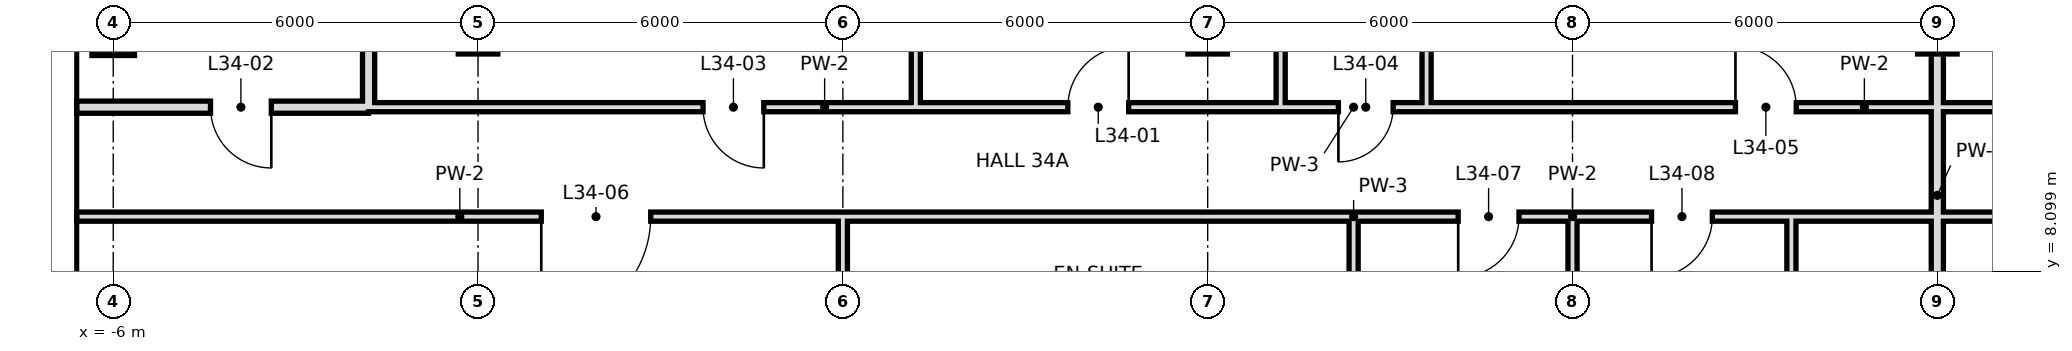
"""IFC4 building model, lengths in metres.
Left out: names, types, materials, properties, quantities, classifications, styles, units other than length and angle.
Written with IfcOpenShell. Run it as: python <this file> out.ifc"""

import sys

from ifc_helpers import new_model, si_unit, direction, frame, frame_2d, origin, origin_2d, place, context, subcontext, project, spatial, rectangle, hollow_rectangle, extrude, element, fill, save


model = new_model("IFC4")
c1 = context("Model", 3, precision=1e-05, world=origin(), true_north=direction((0.0, 1.0)))
c2 = subcontext(c1, "Body", "Model", "MODEL_VIEW")
j1 = project(units=[si_unit("LENGTHUNIT", "METRE"), si_unit("PLANEANGLEUNIT", "RADIAN")], contexts=[c1])
p1 = place(None, origin())
s1 = spatial("IfcSite", under=j1, at=p1, CompositionType="ELEMENT")
p2 = place(p1, origin())
s2 = spatial("IfcBuilding", under=s1, at=p2, CompositionType="ELEMENT")
p3 = place(p2, frame((0.0, 0.0, 151.0)))
s3 = spatial("IfcBuildingStorey", under=s2, at=p3, CompositionType="ELEMENT", Elevation=151.0)
p4 = place(p3, frame((-6.0, 12.0, 0.0), z_axis=(0.0, 0.0, 1.0), x_axis=(1.0, 0.0, 0.0)))
e1 = element("IfcColumn", 1, at=p4, inside=s3, PredefinedType="COLUMN", context=c2, shape_type="SweptSolid", body=[
    extrude(hollow_rectangle(XDim=0.7, YDim=0.7, WallThickness=0.036, at=origin_2d()), origin(), (0.0, 0.0, 1.0), 3.6),
])
for number, where, z_axis, x_axis in (
    (2, (0.0, 12.0, 0.0), (0.0, 0.0, 1.0), (1.0, 0.0, 0.0)),
    (3, (12.0, 12.0, 0.0), (0.0, 0.0, 1.0), (1.0, 0.0, 0.0)),
    (4, (24.0, 12.0, 0.0), (0.0, 0.0, 1.0), (1.0, 0.0, 0.0)),
):
    element("IfcColumn", number, at=place(p3, frame(where, z_axis=z_axis, x_axis=x_axis)), inside=s3, PredefinedType="COLUMN", context=c2, shape_type="SweptSolid", body=[
        extrude(hollow_rectangle(XDim=0.65, YDim=0.65, WallThickness=0.032, at=origin_2d()), origin(), (0.0, 0.0, 1.0), 3.6),
    ])
p5 = place(p3, frame((-1.8, 10.8, 0.0), z_axis=(0.0, 0.0, 1.0), x_axis=(0.0, 1.0, 0.0)))
e5 = element("IfcWall", 5, at=p5, inside=s3, PredefinedType="SOLIDWALL", context=c2, shape_type="SweptSolid", body=[
    extrude(rectangle(XDim=7.2, YDim=0.2, at=frame_2d((3.6, 0.0))), origin(), (0.0, 0.0, 1.0), 3.42),
])
p6 = place(p3, frame((13.2, 10.8, 0.0), z_axis=(0.0, 0.0, 1.0), x_axis=(0.0, 1.0, 0.0)))
e6 = element("IfcWall", 6, at=p6, inside=s3, PredefinedType="PARTITIONING", context=c2, shape_type="SweptSolid", body=[
    extrude(rectangle(XDim=7.9, YDim=0.15, at=frame_2d((3.95, 0.0))), origin(), (0.0, 0.0, 1.0), 3.42),
])
p7 = place(p3, frame((14.4, 6.0, 0.0), z_axis=(0.0, 0.0, 1.0), x_axis=(0.0, 1.0, 0.0)))
e7 = element("IfcWall", 7, at=p7, inside=s3, PredefinedType="PARTITIONING", context=c2, shape_type="SweptSolid", body=[
    extrude(rectangle(XDim=3.0, YDim=0.15, at=frame_2d((1.5, 0.0))), origin(), (0.0, 0.0, 1.0), 3.42),
])
p8 = place(p3, frame((15.6, 10.8, 0.0), z_axis=(0.0, 0.0, 1.0), x_axis=(0.0, 1.0, 0.0)))
e8 = element("IfcWall", 8, at=p8, inside=s3, PredefinedType="PARTITIONING", context=c2, shape_type="SweptSolid", body=[
    extrude(rectangle(XDim=7.9, YDim=0.15, at=frame_2d((3.95, 0.0))), origin(), (0.0, 0.0, 1.0), 3.42),
])
p9 = place(p3, frame((18.0, -0.6, 0.0), z_axis=(0.0, 0.0, 1.0), x_axis=(0.0, 1.0, 0.0)))
e9 = element("IfcWall", 9, at=p9, inside=s3, PredefinedType="PARTITIONING", context=c2, shape_type="SweptSolid", body=[
    extrude(rectangle(XDim=9.6, YDim=0.15, at=frame_2d((4.8, 0.0))), origin(), (0.0, 0.0, 1.0), 2.72),
])
p10 = place(p3, frame((21.6, 6.0, 0.0), z_axis=(0.0, 0.0, 1.0), x_axis=(0.0, 1.0, 0.0)))
e10 = element("IfcWall", 10, at=p10, inside=s3, PredefinedType="PARTITIONING", context=c2, shape_type="SweptSolid", body=[
    extrude(rectangle(XDim=3.0, YDim=0.15, at=frame_2d((1.5, 0.0))), origin(), (0.0, 0.0, 1.0), 3.42),
])
p11 = place(p3, frame((24.0, 0.0, 0.0), z_axis=(0.0, 0.0, 1.0), x_axis=(0.0, 1.0, 0.0)))
e11 = element("IfcWall", 11, at=p11, inside=s3, PredefinedType="SOLIDWALL", context=c2, shape_type="SweptSolid", body=[
    extrude(rectangle(XDim=18.7, YDim=0.2, at=frame_2d((9.35, 0.0))), origin(), (0.0, 0.0, 1.0), 2.72),
])
p12 = place(p3, frame((6.0, 6.0, 0.0), z_axis=(0.0, 0.0, 1.0), x_axis=(0.0, 1.0, 0.0)))
e12 = element("IfcWall", 12, at=p12, inside=s3, PredefinedType="PARTITIONING", context=c2, shape_type="SweptSolid", body=[
    extrude(rectangle(XDim=3.0, YDim=0.15, at=frame_2d((1.5, 0.0))), origin(), (0.0, 0.0, 1.0), 2.72),
])
p13 = place(p3, frame((7.2, 10.8, 0.0), z_axis=(0.0, 0.0, 1.0), x_axis=(0.0, 1.0, 0.0)))
e13 = element("IfcWall", 13, at=p13, inside=s3, PredefinedType="PARTITIONING", context=c2, shape_type="SweptSolid", body=[
    extrude(rectangle(XDim=7.9, YDim=0.15, at=frame_2d((3.95, 0.0))), origin(), (0.0, 0.0, 1.0), 3.42),
])
p14 = place(p3, frame((-6.6, 10.8, 0.0), z_axis=(0.0, 0.0, 1.0), x_axis=(1.0, 0.0, 0.0)))
e14 = element("IfcWall", 14, at=p14, inside=s3, PredefinedType="SOLIDWALL", context=c2, shape_type="SweptSolid", body=[
    extrude(rectangle(XDim=4.8, YDim=0.2, at=frame_2d((2.4, 0.0))), origin(), (0.0, 0.0, 1.0), 2.97),
])
p15 = place(p14, frame((2.2, 0.0, 0.0)))
e15 = element("IfcOpeningElement", 15, at=p15, cuts=e14, PredefinedType="OPENING", context=c2, shape_type="SweptSolid", body=[
    extrude(rectangle(XDim=1.0, YDim=2.4, at=frame_2d((0.5, 1.2))), frame((0.0, 0.11, 0.0), z_axis=(0.0, -1.0, 0.0), x_axis=(1.0, 0.0, 0.0)), (0.0, 0.0, 1.0), 0.22),
])
p16 = place(p3, frame((-1.8, 10.8, 0.0), z_axis=(0.0, 0.0, 1.0), x_axis=(1.0, 0.0, 0.0)))
e16 = element("IfcWall", 16, at=p16, inside=s3, PredefinedType="PARTITIONING", context=c2, shape_type="SweptSolid", body=[
    extrude(rectangle(XDim=15.0, YDim=0.15, at=frame_2d((7.5, 0.0))), origin(), (0.0, 0.0, 1.0), 3.42),
])
p17 = place(p16, frame((11.5, 0.0, 0.0)))
e17 = element("IfcOpeningElement", 17, at=p17, cuts=e16, PredefinedType="OPENING", context=c2, shape_type="SweptSolid", body=[
    extrude(rectangle(XDim=1.0, YDim=2.4, at=frame_2d((0.5, 1.2))), frame((0.0, 0.085, 0.0), z_axis=(0.0, -1.0, 0.0), x_axis=(1.0, 0.0, 0.0)), (0.0, 0.0, 1.0), 0.17),
])
p18 = place(p16, frame((5.5, 0.0, 0.0)))
e18 = element("IfcOpeningElement", 18, at=p18, cuts=e16, PredefinedType="OPENING", context=c2, shape_type="SweptSolid", body=[
    extrude(rectangle(XDim=1.0, YDim=2.4, at=frame_2d((0.5, 1.2))), frame((0.0, 0.085, 0.0), z_axis=(0.0, -1.0, 0.0), x_axis=(1.0, 0.0, 0.0)), (0.0, 0.0, 1.0), 0.17),
])
p19 = place(p3, frame((15.6, 10.8, 0.0), z_axis=(0.0, 0.0, 1.0), x_axis=(1.0, 0.0, 0.0)))
e19 = element("IfcWall", 19, at=p19, inside=s3, PredefinedType="PARTITIONING", context=c2, shape_type="SweptSolid", body=[
    extrude(rectangle(XDim=14.4, YDim=0.15, at=frame_2d((7.2, 0.0))), origin(), (0.0, 0.0, 1.0), 3.42),
])
p20 = place(p19, frame((5.08, 0.0, 0.0)))
e20 = element("IfcOpeningElement", 20, at=p20, cuts=e19, PredefinedType="OPENING", context=c2, shape_type="SweptSolid", body=[
    extrude(rectangle(XDim=1.0, YDim=2.4, at=frame_2d((0.5, 1.2))), frame((0.0, 0.085, 0.0), z_axis=(0.0, -1.0, 0.0), x_axis=(1.0, 0.0, 0.0)), (0.0, 0.0, 1.0), 0.17),
])
p21 = place(p19, frame((10.9, 0.0, 0.0)))
e21 = element("IfcOpeningElement", 21, at=p21, cuts=e19, PredefinedType="OPENING", context=c2, shape_type="SweptSolid", body=[
    extrude(rectangle(XDim=1.0, YDim=2.4, at=frame_2d((0.5, 1.2))), frame((0.0, 0.085, 0.0), z_axis=(0.0, -1.0, 0.0), x_axis=(1.0, 0.0, 0.0)), (0.0, 0.0, 1.0), 0.17),
])
p22 = place(p3, frame((13.2, 10.8, 0.0), z_axis=(0.0, 0.0, 1.0), x_axis=(1.0, 0.0, 0.0)))
e22 = element("IfcWall", 22, at=p22, inside=s3, PredefinedType="PARTITIONING", context=c2, shape_type="SweptSolid", body=[
    extrude(rectangle(XDim=2.4, YDim=0.15, at=frame_2d((1.2, 0.0))), origin(), (0.0, 0.0, 1.0), 3.42),
])
p23 = place(p22, frame((0.95, 0.0, 0.0)))
e23 = element("IfcOpeningElement", 23, at=p23, cuts=e22, PredefinedType="OPENING", context=c2, shape_type="SweptSolid", body=[
    extrude(rectangle(XDim=0.9, YDim=2.4, at=frame_2d((0.45, 1.2))), frame((0.0, 0.085, 0.0), z_axis=(0.0, -1.0, 0.0), x_axis=(1.0, 0.0, 0.0)), (0.0, 0.0, 1.0), 0.17),
])
p24 = place(p3, frame((-6.6, 9.0, 0.0), z_axis=(0.0, 0.0, 1.0), x_axis=(1.0, 0.0, 0.0)))
e24 = element("IfcWall", 24, at=p24, inside=s3, PredefinedType="PARTITIONING", context=c2, shape_type="SweptSolid", body=[
    extrude(rectangle(XDim=12.6, YDim=0.15, at=frame_2d((6.3, 0.0))), origin(), (0.0, 0.0, 1.0), 3.42),
])
p25 = place(p24, frame((7.64, 0.0, 0.0)))
e25 = element("IfcOpeningElement", 25, at=p25, cuts=e24, PredefinedType="OPENING", context=c2, shape_type="SweptSolid", body=[
    extrude(rectangle(XDim=1.8, YDim=2.4, at=frame_2d((0.9, 1.2))), frame((0.0, 0.085, 0.0), z_axis=(0.0, -1.0, 0.0), x_axis=(1.0, 0.0, 0.0)), (0.0, 0.0, 1.0), 0.17),
])
p26 = place(p3, frame((14.4, 9.0, 0.0), z_axis=(0.0, 0.0, 1.0), x_axis=(1.0, 0.0, 0.0)))
e26 = element("IfcWall", 26, at=p26, inside=s3, PredefinedType="PARTITIONING", context=c2, shape_type="SweptSolid", body=[
    extrude(rectangle(XDim=7.2, YDim=0.15, at=frame_2d((3.6, 0.0))), origin(), (0.0, 0.0, 1.0), 3.42),
])
p27 = place(p26, frame((1.72, 0.0, 0.0)))
e27 = element("IfcOpeningElement", 27, at=p27, cuts=e26, PredefinedType="OPENING", context=c2, shape_type="SweptSolid", body=[
    extrude(rectangle(XDim=1.0, YDim=2.4, at=frame_2d((0.5, 1.2))), frame((0.0, 0.085, 0.0), z_axis=(0.0, -1.0, 0.0), x_axis=(1.0, 0.0, 0.0)), (0.0, 0.0, 1.0), 0.17),
])
p28 = place(p26, frame((4.9, 0.0, 0.0)))
e28 = element("IfcOpeningElement", 28, at=p28, cuts=e26, PredefinedType="OPENING", context=c2, shape_type="SweptSolid", body=[
    extrude(rectangle(XDim=1.0, YDim=2.4, at=frame_2d((0.5, 1.2))), frame((0.0, 0.085, 0.0), z_axis=(0.0, -1.0, 0.0), x_axis=(1.0, 0.0, 0.0)), (0.0, 0.0, 1.0), 0.17),
])
p29 = place(p3, frame((24.0, 9.0, 0.0), z_axis=(0.0, 0.0, 1.0), x_axis=(1.0, 0.0, 0.0)))
e29 = element("IfcWall", 29, at=p29, inside=s3, PredefinedType="PARTITIONING", context=c2, shape_type="SweptSolid", body=[
    extrude(rectangle(XDim=27.6, YDim=0.15, at=frame_2d((13.8, 0.0))), origin(), (0.0, 0.0, 1.0), 3.42),
])
p30 = place(p29, frame((3.16, 0.0, 0.0)))
e30 = element("IfcOpeningElement", 30, at=p30, cuts=e29, PredefinedType="OPENING", context=c2, shape_type="SweptSolid", body=[
    extrude(rectangle(XDim=1.8, YDim=2.4, at=frame_2d((0.9, 1.2))), frame((0.0, 0.085, 0.0), z_axis=(0.0, -1.0, 0.0), x_axis=(1.0, 0.0, 0.0)), (0.0, 0.0, 1.0), 0.17),
])
p31 = place(p29, frame((13.6, 0.0, 0.0)))
e31 = element("IfcOpeningElement", 31, at=p31, cuts=e29, PredefinedType="OPENING", context=c2, shape_type="SweptSolid", body=[
    extrude(rectangle(XDim=1.0, YDim=2.4, at=frame_2d((0.5, 1.2))), frame((0.0, 0.085, 0.0), z_axis=(0.0, -1.0, 0.0), x_axis=(1.0, 0.0, 0.0)), (0.0, 0.0, 1.0), 0.17),
])
p32 = place(p29, frame((21.4, 0.0, 0.0)))
e32 = element("IfcOpeningElement", 32, at=p32, cuts=e29, PredefinedType="OPENING", context=c2, shape_type="SweptSolid", body=[
    extrude(rectangle(XDim=1.0, YDim=2.4, at=frame_2d((0.5, 1.2))), frame((0.0, 0.085, 0.0), z_axis=(0.0, -1.0, 0.0), x_axis=(1.0, 0.0, 0.0)), (0.0, 0.0, 1.0), 0.17),
])
p33 = place(p29, frame((24.88, 0.0, 0.0)))
e33 = element("IfcOpeningElement", 33, at=p33, cuts=e29, PredefinedType="OPENING", context=c2, shape_type="SweptSolid", body=[
    extrude(rectangle(XDim=1.0, YDim=2.4, at=frame_2d((0.5, 1.2))), frame((0.0, 0.085, 0.0), z_axis=(0.0, -1.0, 0.0), x_axis=(1.0, 0.0, 0.0)), (0.0, 0.0, 1.0), 0.17),
])
p34 = place(p3, frame((6.0, 9.0, 0.0), z_axis=(0.0, 0.0, 1.0), x_axis=(1.0, 0.0, 0.0)))
e34 = element("IfcWall", 34, at=p34, inside=s3, PredefinedType="PARTITIONING", context=c2, shape_type="SweptSolid", body=[
    extrude(rectangle(XDim=8.4, YDim=0.15, at=frame_2d((4.2, 0.0))), origin(), (0.0, 0.0, 1.0), 3.42),
])
p35 = place(p3, frame((21.6, 9.0, 0.0), z_axis=(0.0, 0.0, 1.0), x_axis=(1.0, 0.0, 0.0)))
e35 = element("IfcWall", 35, at=p35, inside=s3, PredefinedType="PARTITIONING", context=c2, shape_type="SweptSolid", body=[
    extrude(rectangle(XDim=2.4, YDim=0.15, at=frame_2d((1.2, 0.0))), origin(), (0.0, 0.0, 1.0), 3.42),
])
p36 = place(p17, frame((1.0, 0.0, 0.0), z_axis=(0.0, 0.0, 1.0), x_axis=(-1.0, 0.0, 0.0)))
e36 = element("IfcDoor", 36, at=p36, inside=s3, OperationType="SINGLE_SWING_LEFT", PredefinedType="DOOR", context=c2, shape_type="SweptSolid", body=[
    extrude(rectangle(XDim=1.0, YDim=2.4, at=frame_2d((0.5, 1.2))), frame((0.0, 0.025, 0.0), z_axis=(0.0, -1.0, 0.0), x_axis=(1.0, 0.0, 0.0)), (0.0, 0.0, 1.0), 0.05),
])
fill(e17, e36)
p37 = place(p15, origin())
e37 = element("IfcDoor", 37, at=p37, inside=s3, OperationType="SINGLE_SWING_RIGHT", PredefinedType="DOOR", context=c2, shape_type="SweptSolid", body=[
    extrude(rectangle(XDim=1.0, YDim=2.4, at=frame_2d((0.5, 1.2))), frame((0.0, 0.025, 0.0), z_axis=(0.0, -1.0, 0.0), x_axis=(1.0, 0.0, 0.0)), (0.0, 0.0, 1.0), 0.05),
])
fill(e15, e37)
p38 = place(p18, origin())
e38 = element("IfcDoor", 38, at=p38, inside=s3, OperationType="SINGLE_SWING_RIGHT", PredefinedType="DOOR", context=c2, shape_type="SweptSolid", body=[
    extrude(rectangle(XDim=1.0, YDim=2.4, at=frame_2d((0.5, 1.2))), frame((0.0, 0.025, 0.0), z_axis=(0.0, -1.0, 0.0), x_axis=(1.0, 0.0, 0.0)), (0.0, 0.0, 1.0), 0.05),
])
fill(e18, e38)
p39 = place(p23, frame((0.9, 0.0, 0.0), z_axis=(0.0, 0.0, 1.0), x_axis=(-1.0, 0.0, 0.0)))
e39 = element("IfcDoor", 39, at=p39, inside=s3, OperationType="SINGLE_SWING_RIGHT", PredefinedType="DOOR", context=c2, shape_type="SweptSolid", body=[
    extrude(rectangle(XDim=0.9, YDim=2.4, at=frame_2d((0.45, 1.2))), frame((0.0, 0.025, 0.0), z_axis=(0.0, -1.0, 0.0), x_axis=(1.0, 0.0, 0.0)), (0.0, 0.0, 1.0), 0.05),
])
fill(e23, e39)
p40 = place(p20, origin())
e40 = element("IfcDoor", 40, at=p40, inside=s3, OperationType="SINGLE_SWING_LEFT", PredefinedType="DOOR", context=c2, shape_type="SweptSolid", body=[
    extrude(rectangle(XDim=1.0, YDim=2.4, at=frame_2d((0.5, 1.2))), frame((0.0, 0.025, 0.0), z_axis=(0.0, -1.0, 0.0), x_axis=(1.0, 0.0, 0.0)), (0.0, 0.0, 1.0), 0.05),
])
fill(e20, e40)
p41 = place(p25, frame((1.8, 0.0, 0.0), z_axis=(0.0, 0.0, 1.0), x_axis=(-1.0, 0.0, 0.0)))
e41 = element("IfcDoor", 41, at=p41, inside=s3, OperationType="SINGLE_SWING_RIGHT", PredefinedType="DOOR", context=c2, shape_type="SweptSolid", body=[
    extrude(rectangle(XDim=1.8, YDim=2.4, at=frame_2d((0.9, 1.2))), frame((0.0, 0.025, 0.0), z_axis=(0.0, -1.0, 0.0), x_axis=(1.0, 0.0, 0.0)), (0.0, 0.0, 1.0), 0.05),
])
fill(e25, e41)
p42 = place(p27, frame((1.0, 0.0, 0.0), z_axis=(0.0, 0.0, 1.0), x_axis=(-1.0, 0.0, 0.0)))
e42 = element("IfcDoor", 42, at=p42, inside=s3, OperationType="SINGLE_SWING_RIGHT", PredefinedType="DOOR", context=c2, shape_type="SweptSolid", body=[
    extrude(rectangle(XDim=1.0, YDim=2.4, at=frame_2d((0.5, 1.2))), frame((0.0, 0.025, 0.0), z_axis=(0.0, -1.0, 0.0), x_axis=(1.0, 0.0, 0.0)), (0.0, 0.0, 1.0), 0.05),
])
fill(e27, e42)
p43 = place(p28, frame((1.0, 0.0, 0.0), z_axis=(0.0, 0.0, 1.0), x_axis=(-1.0, 0.0, 0.0)))
e43 = element("IfcDoor", 43, at=p43, inside=s3, OperationType="SINGLE_SWING_RIGHT", PredefinedType="DOOR", context=c2, shape_type="SweptSolid", body=[
    extrude(rectangle(XDim=1.0, YDim=2.4, at=frame_2d((0.5, 1.2))), frame((0.0, 0.025, 0.0), z_axis=(0.0, -1.0, 0.0), x_axis=(1.0, 0.0, 0.0)), (0.0, 0.0, 1.0), 0.05),
])
fill(e28, e43)
save(model, sys.argv[1])
